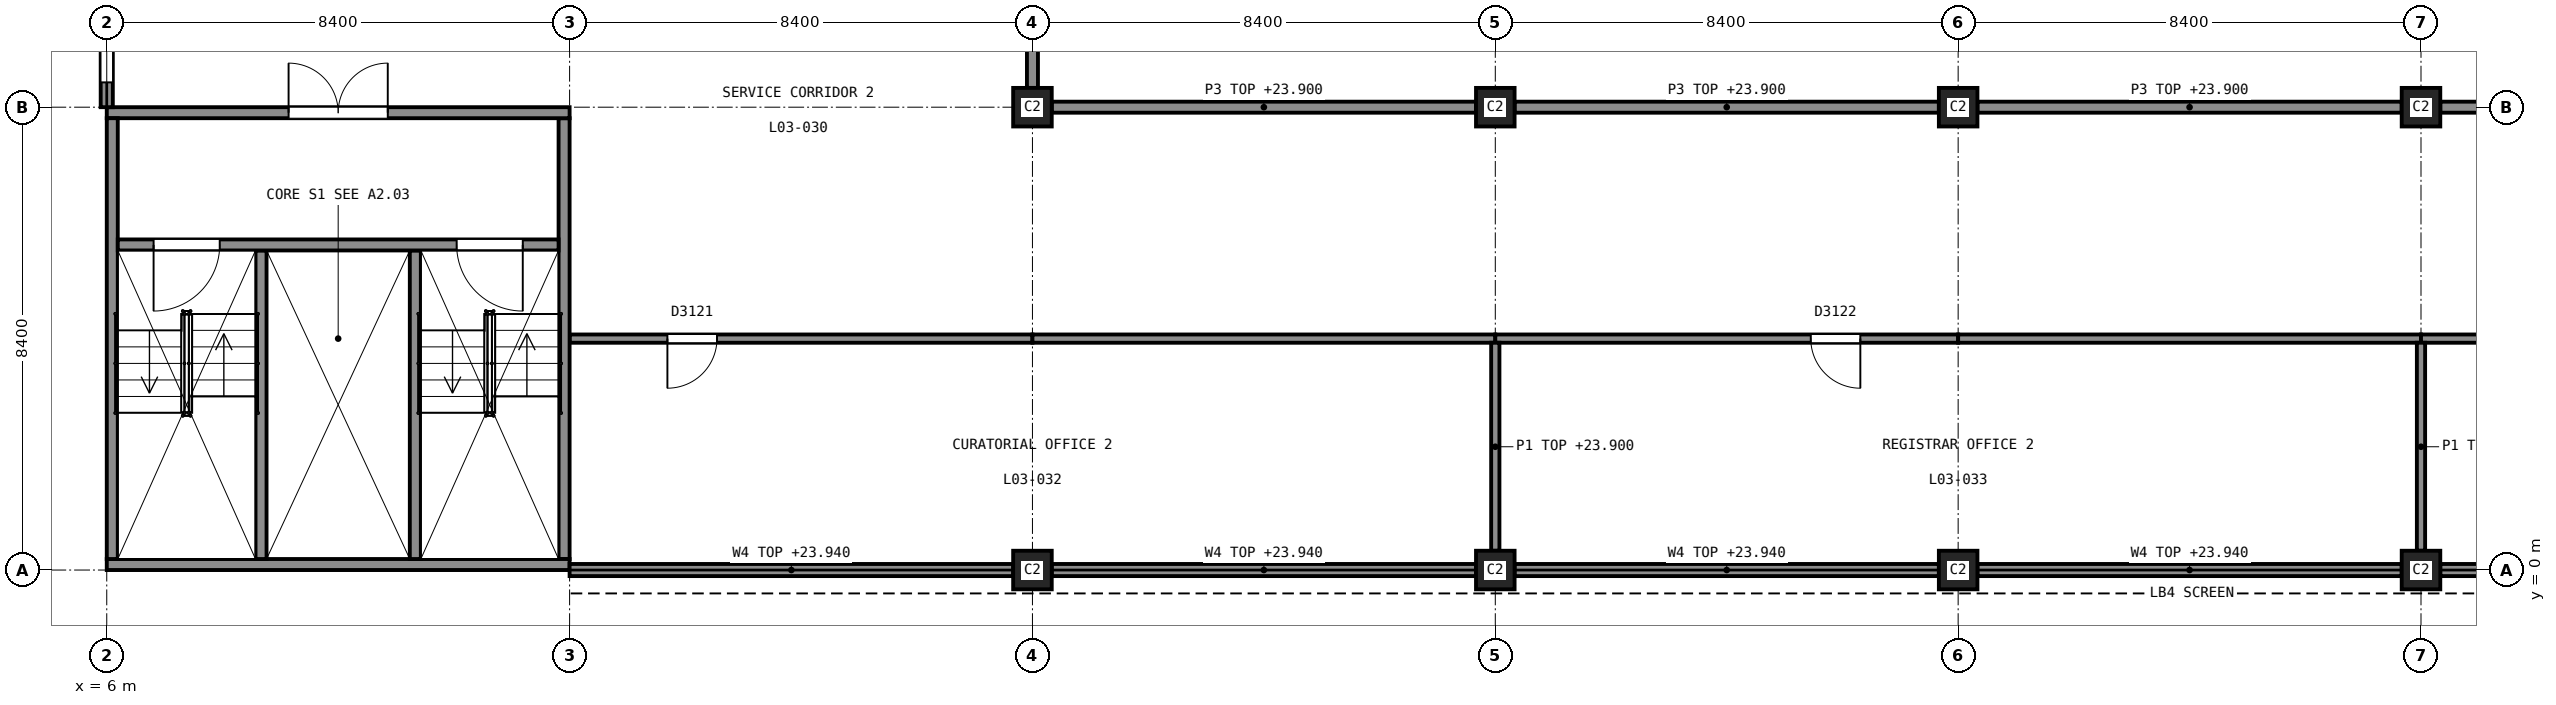
"""IFC4 building model, lengths in metres.
Left out: names, types, materials, properties, quantities, classifications, styles, units other than length and angle.
Written with IfcOpenShell. Run it as: python <this file> out.ifc"""

import sys

from ifc_helpers import new_model, si_unit, direction, frame, frame_2d, origin, origin_2d, place, context, subcontext, project, spatial, rectangle, extrude, element, fill, save


model = new_model("IFC4")
c1 = context("Model", 3, precision=1e-05, world=origin(), true_north=direction((0.0, 1.0)))
c2 = subcontext(c1, "Body", "Model", "MODEL_VIEW")
j1 = project(units=[si_unit("LENGTHUNIT", "METRE"), si_unit("PLANEANGLEUNIT", "RADIAN")], contexts=[c1])
p1 = place(None, origin())
s1 = spatial("IfcSite", under=j1, at=p1, CompositionType="ELEMENT")
p2 = place(p1, origin())
s2 = spatial("IfcBuilding", under=s1, at=p2, CompositionType="ELEMENT")
p3 = place(p2, frame((0.0, 0.0, 20.0)))
s3 = spatial("IfcBuildingStorey", under=s2, at=p3, CompositionType="ELEMENT", Elevation=20.0)
p4 = place(p3, frame((6.0, 0.1, 0.0), z_axis=(0.0, 0.0, 1.0), x_axis=(1.0, 0.0, 0.0)))
e1 = element("IfcWall", 1, at=p4, inside=s3, PredefinedType="SHEAR", context=c2, shape_type="SweptSolid", body=[
    extrude(rectangle(XDim=8.4, YDim=0.2, at=frame_2d((4.2, 0.0))), origin(), (0.0, 0.0, 1.0), 5.0),
])
p5 = place(p3, frame((6.0, 8.3, 0.0), z_axis=(0.0, 0.0, 1.0), x_axis=(1.0, 0.0, 0.0)))
e2 = element("IfcWall", 2, at=p5, inside=s3, PredefinedType="SHEAR", context=c2, shape_type="SweptSolid", body=[
    extrude(rectangle(XDim=8.4, YDim=0.2, at=frame_2d((4.2, 0.0))), origin(), (0.0, 0.0, 1.0), 5.0),
])
p6 = place(p5, frame((3.3, 0.0, 0.0)))
e3 = element("IfcOpeningElement", 3, at=p6, cuts=e2, PredefinedType="OPENING", context=c2, shape_type="SweptSolid", body=[
    extrude(rectangle(XDim=1.8, YDim=2.1, at=frame_2d((0.9, 1.05))), frame((0.0, 0.11, 0.0), z_axis=(0.0, -1.0, 0.0), x_axis=(1.0, 0.0, 0.0)), (0.0, 0.0, 1.0), 0.22),
])
for number, where, z_axis, x_axis in (
    (4, (6.1, 0.2, 0.0), (0.0, 0.0, 1.0), (0.0, 1.0, 0.0)),
    (5, (14.3, 0.2, 0.0), (0.0, 0.0, 1.0), (0.0, 1.0, 0.0)),
):
    element("IfcWall", number, at=place(p3, frame(where, z_axis=z_axis, x_axis=x_axis)), inside=s3, PredefinedType="SHEAR", context=c2, shape_type="SweptSolid", body=[
        extrude(rectangle(XDim=8.0, YDim=0.2, at=frame_2d((4.0, 0.0))), origin(), (0.0, 0.0, 1.0), 5.0),
    ])
p7 = place(p3, frame((6.2, 5.9, 0.0), z_axis=(0.0, 0.0, 1.0), x_axis=(1.0, 0.0, 0.0)))
e6 = element("IfcWall", 6, at=p7, inside=s3, PredefinedType="SHEAR", context=c2, shape_type="SweptSolid", body=[
    extrude(rectangle(XDim=8.0, YDim=0.2, at=frame_2d((4.0, 0.0))), origin(), (0.0, 0.0, 1.0), 5.0),
])
p8 = place(p7, frame((0.65, 0.0, 0.0)))
e7 = element("IfcOpeningElement", 7, at=p8, cuts=e6, PredefinedType="OPENING", context=c2, shape_type="SweptSolid", body=[
    extrude(rectangle(XDim=1.2, YDim=2.1, at=frame_2d((0.6, 1.05))), frame((0.0, 0.11, 0.0), z_axis=(0.0, -1.0, 0.0), x_axis=(1.0, 0.0, 0.0)), (0.0, 0.0, 1.0), 0.22),
])
p9 = place(p7, frame((6.15, 0.0, 0.0)))
e8 = element("IfcOpeningElement", 8, at=p9, cuts=e6, PredefinedType="OPENING", context=c2, shape_type="SweptSolid", body=[
    extrude(rectangle(XDim=1.2, YDim=2.1, at=frame_2d((0.6, 1.05))), frame((0.0, 0.11, 0.0), z_axis=(0.0, -1.0, 0.0), x_axis=(1.0, 0.0, 0.0)), (0.0, 0.0, 1.0), 0.22),
])
for number, where, z_axis, x_axis in (
    (9, (8.8, 0.2, 0.0), (0.0, 0.0, 1.0), (0.0, 1.0, 0.0)),
    (10, (11.6, 0.2, 0.0), (0.0, 0.0, 1.0), (0.0, 1.0, 0.0)),
):
    element("IfcWall", number, at=place(p3, frame(where, z_axis=z_axis, x_axis=x_axis)), inside=s3, PredefinedType="SHEAR", context=c2, shape_type="SweptSolid", body=[
        extrude(rectangle(XDim=5.6, YDim=0.2, at=frame_2d((2.8, 0.0))), origin(), (0.0, 0.0, 1.0), 5.0),
    ])
for number, where, z_axis, x_axis in (
    (11, (22.8, 0.0, 0.0), (0.0, 0.0, 1.0), (1.0, 0.0, 0.0)),
    (12, (22.8, 8.4, 0.0), (0.0, 0.0, 1.0), (1.0, 0.0, 0.0)),
    (13, (31.2, 0.0, 0.0), (0.0, 0.0, 1.0), (1.0, 0.0, 0.0)),
    (14, (31.2, 8.4, 0.0), (0.0, 0.0, 1.0), (1.0, 0.0, 0.0)),
    (15, (39.6, 0.0, 0.0), (0.0, 0.0, 1.0), (1.0, 0.0, 0.0)),
    (16, (39.6, 8.4, 0.0), (0.0, 0.0, 1.0), (1.0, 0.0, 0.0)),
    (17, (48.0, 0.0, 0.0), (0.0, 0.0, 1.0), (1.0, 0.0, 0.0)),
    (18, (48.0, 8.4, 0.0), (0.0, 0.0, 1.0), (1.0, 0.0, 0.0)),
):
    element("IfcColumn", number, at=place(p3, frame(where, z_axis=z_axis, x_axis=x_axis)), inside=s3, PredefinedType="COLUMN", context=c2, shape_type="SweptSolid", body=[
        extrude(rectangle(XDim=0.7, YDim=0.7, at=origin_2d()), origin(), (0.0, 0.0, 1.0), 5.0),
    ])
p10 = place(p3, frame((14.4, 0.0, 0.0), z_axis=(0.0, 0.0, 1.0), x_axis=(1.0, 0.0, 0.0)))
e19 = element("IfcWall", 19, at=p10, inside=s3, PredefinedType="SOLIDWALL", context=c2, shape_type="SweptSolid", body=[
    extrude(rectangle(XDim=8.05, YDim=0.22, at=frame_2d((4.025, 0.0))), origin(), (0.0, 0.0, 1.0), 3.94),
])
p11 = place(p3, frame((23.15, 0.0, 0.0), z_axis=(0.0, 0.0, 1.0), x_axis=(1.0, 0.0, 0.0)))
e20 = element("IfcWall", 20, at=p11, inside=s3, PredefinedType="SOLIDWALL", context=c2, shape_type="SweptSolid", body=[
    extrude(rectangle(XDim=7.7, YDim=0.22, at=frame_2d((3.85, 0.0))), origin(), (0.0, 0.0, 1.0), 3.94),
])
for number, where, z_axis, x_axis in (
    (21, (31.55, 0.0, 0.0), (0.0, 0.0, 1.0), (1.0, 0.0, 0.0)),
    (22, (39.95, 0.0, 0.0), (0.0, 0.0, 1.0), (1.0, 0.0, 0.0)),
    (23, (48.35, 0.0, 0.0), (0.0, 0.0, 1.0), (1.0, 0.0, 0.0)),
):
    element("IfcWall", number, at=place(p3, frame(where, z_axis=z_axis, x_axis=x_axis)), inside=s3, PredefinedType="SOLIDWALL", context=c2, shape_type="SweptSolid", body=[
        extrude(rectangle(XDim=7.7, YDim=0.22, at=frame_2d((3.85, 0.0))), origin(), (0.0, 0.0, 1.0), 3.94),
    ])
p12 = place(p3, frame((6.0, 8.4, 0.0), z_axis=(0.0, 0.0, 1.0), x_axis=(0.0, 1.0, 0.0)))
e24 = element("IfcWall", 24, at=p12, inside=s3, PredefinedType="SOLIDWALL", context=c2, shape_type="SweptSolid", body=[
    extrude(rectangle(XDim=8.05, YDim=0.22, at=frame_2d((4.025, 0.0))), origin(), (0.0, 0.0, 1.0), 3.94),
])
p13 = place(p12, frame((0.45, 0.0, 0.9)))
e25 = element("IfcOpeningElement", 25, at=p13, cuts=e24, PredefinedType="OPENING", context=c2, shape_type="SweptSolid", body=[
    extrude(rectangle(XDim=3.6, YDim=1.5, at=frame_2d((1.8, 0.75))), frame((0.0, 0.12, 0.0), z_axis=(0.0, -1.0, 0.0), x_axis=(1.0, 0.0, 0.0)), (0.0, 0.0, 1.0), 0.24),
])
p14 = place(p3, frame((23.15, 8.4, 0.0), z_axis=(0.0, 0.0, 1.0), x_axis=(1.0, 0.0, 0.0)))
e26 = element("IfcWall", 26, at=p14, inside=s3, PredefinedType="PARTITIONING", context=c2, shape_type="SweptSolid", body=[
    extrude(rectangle(XDim=7.7, YDim=0.2, at=frame_2d((3.85, 0.0))), origin(), (0.0, 0.0, 1.0), 3.9),
])
for number, where, z_axis, x_axis in (
    (27, (31.55, 8.4, 0.0), (0.0, 0.0, 1.0), (1.0, 0.0, 0.0)),
    (28, (39.95, 8.4, 0.0), (0.0, 0.0, 1.0), (1.0, 0.0, 0.0)),
):
    element("IfcWall", number, at=place(p3, frame(where, z_axis=z_axis, x_axis=x_axis)), inside=s3, PredefinedType="PARTITIONING", context=c2, shape_type="SweptSolid", body=[
        extrude(rectangle(XDim=7.7, YDim=0.2, at=frame_2d((3.85, 0.0))), origin(), (0.0, 0.0, 1.0), 3.9),
    ])
p15 = place(p3, frame((48.35, 8.4, 0.0), z_axis=(0.0, 0.0, 1.0), x_axis=(1.0, 0.0, 0.0)))
e29 = element("IfcWall", 29, at=p15, inside=s3, PredefinedType="PARTITIONING", context=c2, shape_type="SweptSolid", body=[
    extrude(rectangle(XDim=8.05, YDim=0.2, at=frame_2d((4.025, 0.0))), origin(), (0.0, 0.0, 1.0), 3.9),
])
p16 = place(p15, frame((4.325, 0.0, 0.0)))
e30 = element("IfcOpeningElement", 30, at=p16, cuts=e29, PredefinedType="OPENING", context=c2, shape_type="SweptSolid", body=[
    extrude(rectangle(XDim=3.0, YDim=3.0, at=frame_2d((1.5, 1.5))), frame((0.0, 0.11, 0.0), z_axis=(0.0, -1.0, 0.0), x_axis=(1.0, 0.0, 0.0)), (0.0, 0.0, 1.0), 0.22),
])
p17 = place(p3, frame((22.8, 8.75, 0.0), z_axis=(0.0, 0.0, 1.0), x_axis=(0.0, 1.0, 0.0)))
e31 = element("IfcWall", 31, at=p17, inside=s3, PredefinedType="PARTITIONING", context=c2, shape_type="SweptSolid", body=[
    extrude(rectangle(XDim=3.75, YDim=0.2, at=frame_2d((1.875, 0.0))), origin(), (0.0, 0.0, 1.0), 3.9),
])
p18 = place(p3, frame((14.4, 4.2, 0.0), z_axis=(0.0, 0.0, 1.0), x_axis=(1.0, 0.0, 0.0)))
e32 = element("IfcWall", 32, at=p18, inside=s3, PredefinedType="PARTITIONING", context=c2, shape_type="SweptSolid", body=[
    extrude(rectangle(XDim=8.4, YDim=0.15, at=frame_2d((4.2, 0.0))), origin(), (0.0, 0.0, 1.0), 3.9),
])
p19 = place(p18, frame((1.775, 0.0, 0.0)))
e33 = element("IfcOpeningElement", 33, at=p19, cuts=e32, PredefinedType="OPENING", context=c2, shape_type="SweptSolid", body=[
    extrude(rectangle(XDim=0.9, YDim=2.1, at=frame_2d((0.45, 1.05))), frame((0.0, 0.085, 0.0), z_axis=(0.0, -1.0, 0.0), x_axis=(1.0, 0.0, 0.0)), (0.0, 0.0, 1.0), 0.17),
])
p20 = place(p3, frame((22.8, 4.2, 0.0), z_axis=(0.0, 0.0, 1.0), x_axis=(1.0, 0.0, 0.0)))
e34 = element("IfcWall", 34, at=p20, inside=s3, PredefinedType="PARTITIONING", context=c2, shape_type="SweptSolid", body=[
    extrude(rectangle(XDim=8.4, YDim=0.15, at=frame_2d((4.2, 0.0))), origin(), (0.0, 0.0, 1.0), 3.9),
])
p21 = place(p3, frame((31.2, 4.2, 0.0), z_axis=(0.0, 0.0, 1.0), x_axis=(1.0, 0.0, 0.0)))
e35 = element("IfcWall", 35, at=p21, inside=s3, PredefinedType="PARTITIONING", context=c2, shape_type="SweptSolid", body=[
    extrude(rectangle(XDim=8.4, YDim=0.15, at=frame_2d((4.2, 0.0))), origin(), (0.0, 0.0, 1.0), 3.9),
])
p22 = place(p21, frame((5.725, 0.0, 0.0)))
e36 = element("IfcOpeningElement", 36, at=p22, cuts=e35, PredefinedType="OPENING", context=c2, shape_type="SweptSolid", body=[
    extrude(rectangle(XDim=0.9, YDim=2.1, at=frame_2d((0.45, 1.05))), frame((0.0, 0.085, 0.0), z_axis=(0.0, -1.0, 0.0), x_axis=(1.0, 0.0, 0.0)), (0.0, 0.0, 1.0), 0.17),
])
p23 = place(p3, frame((39.6, 4.2, 0.0), z_axis=(0.0, 0.0, 1.0), x_axis=(1.0, 0.0, 0.0)))
e37 = element("IfcWall", 37, at=p23, inside=s3, PredefinedType="PARTITIONING", context=c2, shape_type="SweptSolid", body=[
    extrude(rectangle(XDim=8.4, YDim=0.15, at=frame_2d((4.2, 0.0))), origin(), (0.0, 0.0, 1.0), 3.9),
])
p24 = place(p3, frame((48.0, 4.2, 0.0), z_axis=(0.0, 0.0, 1.0), x_axis=(1.0, 0.0, 0.0)))
e38 = element("IfcWall", 38, at=p24, inside=s3, PredefinedType="PARTITIONING", context=c2, shape_type="SweptSolid", body=[
    extrude(rectangle(XDim=8.4, YDim=0.15, at=frame_2d((4.2, 0.0))), origin(), (0.0, 0.0, 1.0), 3.9),
])
p25 = place(p24, frame((1.812, 0.0, 0.0)))
e39 = element("IfcOpeningElement", 39, at=p25, cuts=e38, PredefinedType="OPENING", context=c2, shape_type="SweptSolid", body=[
    extrude(rectangle(XDim=0.9, YDim=2.1, at=frame_2d((0.45, 1.05))), frame((0.0, 0.085, 0.0), z_axis=(0.0, -1.0, 0.0), x_axis=(1.0, 0.0, 0.0)), (0.0, 0.0, 1.0), 0.17),
])
for number, where, z_axis, x_axis in (
    (40, (31.2, 0.35, 0.0), (0.0, 0.0, 1.0), (0.0, 1.0, 0.0)),
    (41, (48.0, 0.35, 0.0), (0.0, 0.0, 1.0), (0.0, 1.0, 0.0)),
):
    element("IfcWall", number, at=place(p3, frame(where, z_axis=z_axis, x_axis=x_axis)), inside=s3, PredefinedType="PARTITIONING", context=c2, shape_type="SweptSolid", body=[
        extrude(rectangle(XDim=3.775, YDim=0.15, at=frame_2d((1.887, 0.0))), origin(), (0.0, 0.0, 1.0), 3.9),
    ])
p26 = place(p13, origin())
e42 = element("IfcWindow", 42, at=p26, inside=s3, PartitioningType="DOUBLE_PANEL_VERTICAL", PredefinedType="WINDOW", context=c2, shape_type="SweptSolid", body=[
    extrude(rectangle(XDim=3.6, YDim=1.5, at=frame_2d((1.8, 0.75))), frame((0.0, -0.03, 0.0), z_axis=(0.0, -1.0, 0.0), x_axis=(1.0, 0.0, 0.0)), (0.0, 0.0, 1.0), 0.06),
])
fill(e25, e42)
p27 = place(p19, origin())
e43 = element("IfcDoor", 43, at=p27, inside=s3, OperationType="SINGLE_SWING_LEFT", PredefinedType="DOOR", context=c2, shape_type="SweptSolid", body=[
    extrude(rectangle(XDim=0.9, YDim=2.1, at=frame_2d((0.45, 1.05))), frame((0.0, 0.025, 0.0), z_axis=(0.0, -1.0, 0.0), x_axis=(1.0, 0.0, 0.0)), (0.0, 0.0, 1.0), 0.05),
])
fill(e33, e43)
p28 = place(p22, origin())
e44 = element("IfcDoor", 44, at=p28, inside=s3, OperationType="SINGLE_SWING_RIGHT", PredefinedType="DOOR", context=c2, shape_type="SweptSolid", body=[
    extrude(rectangle(XDim=0.9, YDim=2.1, at=frame_2d((0.45, 1.05))), frame((0.0, 0.025, 0.0), z_axis=(0.0, -1.0, 0.0), x_axis=(1.0, 0.0, 0.0)), (0.0, 0.0, 1.0), 0.05),
])
fill(e36, e44)
p29 = place(p6, origin())
e45 = element("IfcDoor", 45, at=p29, inside=s3, OperationType="DOUBLE_DOOR_SINGLE_SWING", PredefinedType="DOOR", context=c2, shape_type="SweptSolid", body=[
    extrude(rectangle(XDim=1.8, YDim=2.1, at=frame_2d((0.9, 1.05))), frame((0.0, 0.025, 0.0), z_axis=(0.0, -1.0, 0.0), x_axis=(1.0, 0.0, 0.0)), (0.0, 0.0, 1.0), 0.05),
])
fill(e3, e45)
p30 = place(p8, origin())
e46 = element("IfcDoor", 46, at=p30, inside=s3, OperationType="SINGLE_SWING_LEFT", PredefinedType="DOOR", context=c2, shape_type="SweptSolid", body=[
    extrude(rectangle(XDim=1.2, YDim=2.1, at=frame_2d((0.6, 1.05))), frame((0.0, 0.025, 0.0), z_axis=(0.0, -1.0, 0.0), x_axis=(1.0, 0.0, 0.0)), (0.0, 0.0, 1.0), 0.05),
])
fill(e7, e46)
p31 = place(p9, origin())
e47 = element("IfcDoor", 47, at=p31, inside=s3, OperationType="SINGLE_SWING_RIGHT", PredefinedType="DOOR", context=c2, shape_type="SweptSolid", body=[
    extrude(rectangle(XDim=1.2, YDim=2.1, at=frame_2d((0.6, 1.05))), frame((0.0, 0.025, 0.0), z_axis=(0.0, -1.0, 0.0), x_axis=(1.0, 0.0, 0.0)), (0.0, 0.0, 1.0), 0.05),
])
fill(e8, e47)
save(model, sys.argv[1])
